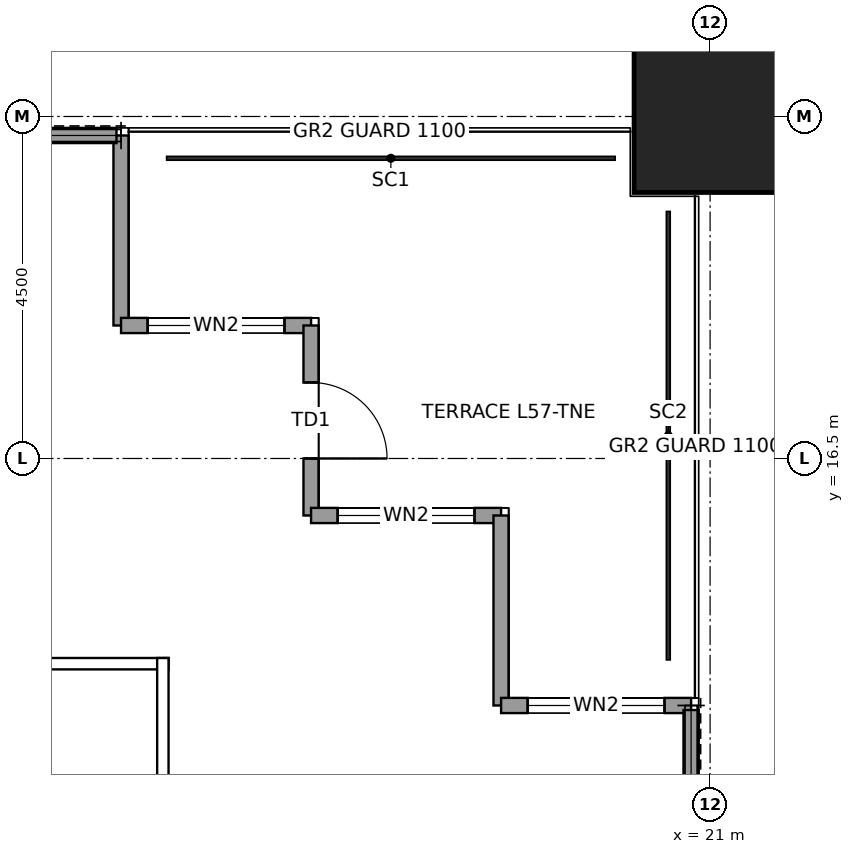
"""IFC4 building model, lengths in metres.
Left out: names, types, materials, properties, quantities, classifications, styles, units other than length and angle.
Written with IfcOpenShell. Run it as: python <this file> out.ifc"""

import sys

from ifc_helpers import new_model, si_unit, direction, frame, frame_2d, origin, origin_2d, place, context, subcontext, project, spatial, rectangle, hollow_rectangle, extrude, element, fill, save


model = new_model("IFC4")
c1 = context("Model", 3, precision=1e-05, world=origin(), true_north=direction((0.0, 1.0)))
c2 = subcontext(c1, "Body", "Model", "MODEL_VIEW")
j1 = project(units=[si_unit("LENGTHUNIT", "METRE"), si_unit("PLANEANGLEUNIT", "RADIAN")], contexts=[c1])
p1 = place(None, origin())
s1 = spatial("IfcSite", under=j1, at=p1, CompositionType="ELEMENT")
p2 = place(p1, origin())
s2 = spatial("IfcBuilding", under=s1, at=p2, CompositionType="ELEMENT")
p3 = place(p2, frame((0.0, 0.0, 263.9)))
s3 = spatial("IfcBuildingStorey", under=s2, at=p3, CompositionType="ELEMENT", Elevation=263.9)
p4 = place(p3, frame((21.0, 21.0, 0.0), z_axis=(0.0, 0.0, 1.0), x_axis=(1.0, 0.0, 0.0)))
e1 = element("IfcColumn", 1, at=p4, inside=s3, PredefinedType="COLUMN", context=c2, shape_type="SweptSolid", body=[
    extrude(hollow_rectangle(XDim=2.0, YDim=2.0, WallThickness=0.095, at=origin_2d()), origin(), (0.0, 0.0, 1.0), 4.0),
])
p5 = place(p3, frame((13.25, 20.75, 0.0), z_axis=(0.0, 0.0, 1.0), x_axis=(0.0, -1.0, 0.0)))
e2 = element("IfcWall", 2, at=p5, inside=s3, PredefinedType="SOLIDWALL", context=c2, shape_type="SweptSolid", body=[
    extrude(rectangle(XDim=2.5, YDim=0.2, at=frame_2d((1.25, 0.0))), origin(), (0.0, 0.0, 1.0), 3.85),
])
p6 = place(p3, frame((13.25, 18.25, 0.0), z_axis=(0.0, 0.0, 1.0), x_axis=(1.0, 0.0, 0.0)))
e3 = element("IfcWall", 3, at=p6, inside=s3, PredefinedType="SOLIDWALL", context=c2, shape_type="SweptSolid", body=[
    extrude(rectangle(XDim=2.5, YDim=0.2, at=frame_2d((1.25, 0.0))), origin(), (0.0, 0.0, 1.0), 3.85),
])
p7 = place(p6, frame((0.35, 0.0, 0.3)))
e4 = element("IfcOpeningElement", 4, at=p7, cuts=e3, PredefinedType="OPENING", context=c2, shape_type="SweptSolid", body=[
    extrude(rectangle(XDim=1.8, YDim=2.4, at=frame_2d((0.9, 1.2))), frame((0.0, 0.11, 0.0), z_axis=(0.0, -1.0, 0.0), x_axis=(1.0, 0.0, 0.0)), (0.0, 0.0, 1.0), 0.22),
])
p8 = place(p3, frame((15.75, 18.25, 0.0), z_axis=(0.0, 0.0, 1.0), x_axis=(0.0, -1.0, 0.0)))
e5 = element("IfcWall", 5, at=p8, inside=s3, PredefinedType="SOLIDWALL", context=c2, shape_type="SweptSolid", body=[
    extrude(rectangle(XDim=2.5, YDim=0.2, at=frame_2d((1.25, 0.0))), origin(), (0.0, 0.0, 1.0), 3.317),
])
p9 = place(p8, frame((0.75, 0.0, 0.0)))
e6 = element("IfcOpeningElement", 6, at=p9, cuts=e5, PredefinedType="OPENING", context=c2, shape_type="SweptSolid", body=[
    extrude(rectangle(XDim=1.0, YDim=2.4, at=frame_2d((0.5, 1.2))), frame((0.0, 0.11, 0.0), z_axis=(0.0, -1.0, 0.0), x_axis=(1.0, 0.0, 0.0)), (0.0, 0.0, 1.0), 0.22),
])
p10 = place(p3, frame((15.75, 15.75, 0.0), z_axis=(0.0, 0.0, 1.0), x_axis=(1.0, 0.0, 0.0)))
e7 = element("IfcWall", 7, at=p10, inside=s3, PredefinedType="SOLIDWALL", context=c2, shape_type="SweptSolid", body=[
    extrude(rectangle(XDim=2.5, YDim=0.2, at=frame_2d((1.25, 0.0))), origin(), (0.0, 0.0, 1.0), 3.85),
])
p11 = place(p10, frame((0.35, 0.0, 0.3)))
e8 = element("IfcOpeningElement", 8, at=p11, cuts=e7, PredefinedType="OPENING", context=c2, shape_type="SweptSolid", body=[
    extrude(rectangle(XDim=1.8, YDim=2.4, at=frame_2d((0.9, 1.2))), frame((0.0, 0.11, 0.0), z_axis=(0.0, -1.0, 0.0), x_axis=(1.0, 0.0, 0.0)), (0.0, 0.0, 1.0), 0.22),
])
p12 = place(p3, frame((18.25, 15.75, 0.0), z_axis=(0.0, 0.0, 1.0), x_axis=(0.0, -1.0, 0.0)))
e9 = element("IfcWall", 9, at=p12, inside=s3, PredefinedType="SOLIDWALL", context=c2, shape_type="SweptSolid", body=[
    extrude(rectangle(XDim=2.5, YDim=0.2, at=frame_2d((1.25, 0.0))), origin(), (0.0, 0.0, 1.0), 3.85),
])
p13 = place(p3, frame((18.25, 13.25, 0.0), z_axis=(0.0, 0.0, 1.0), x_axis=(1.0, 0.0, 0.0)))
e10 = element("IfcWall", 10, at=p13, inside=s3, PredefinedType="SOLIDWALL", context=c2, shape_type="SweptSolid", body=[
    extrude(rectangle(XDim=2.5, YDim=0.2, at=frame_2d((1.25, 0.0))), origin(), (0.0, 0.0, 1.0), 3.85),
])
p14 = place(p13, frame((0.35, 0.0, 0.3)))
e11 = element("IfcOpeningElement", 11, at=p14, cuts=e10, PredefinedType="OPENING", context=c2, shape_type="SweptSolid", body=[
    extrude(rectangle(XDim=1.8, YDim=2.4, at=frame_2d((0.9, 1.2))), frame((0.0, 0.11, 0.0), z_axis=(0.0, -1.0, 0.0), x_axis=(1.0, 0.0, 0.0)), (0.0, 0.0, 1.0), 0.22),
])
for number, where, z_axis, x_axis in (
    (12, (10.435, 20.75, 0.0), (0.0, 0.0, 1.0), (1.0, 0.0, 0.0)),
    (13, (20.75, 13.19, 0.0), (0.0, 0.0, 1.0), (0.0, -1.0, 0.0)),
):
    element("IfcWall", number, at=place(p3, frame(where, z_axis=z_axis, x_axis=x_axis)), inside=s3, PredefinedType="SOLIDWALL", context=c2, shape_type="SweptSolid", body=[
        extrude(rectangle(XDim=2.755, YDim=0.2, at=frame_2d((1.377, 0.0))), origin(), (0.0, 0.0, 1.0), 3.85),
    ])
p15 = place(p3, frame((-13.875, 13.8, 0.0), z_axis=(0.0, 0.0, 1.0), x_axis=(1.0, 0.0, 0.0)))
e14 = element("IfcWall", 14, at=p15, inside=s3, PredefinedType="PARTITIONING", context=c2, shape_type="SweptSolid", body=[
    extrude(rectangle(XDim=27.75, YDim=0.15, at=frame_2d((13.875, 0.0))), origin(), (0.0, 0.0, 1.0), 3.85),
])
p16 = place(p15, frame((20.275, 0.0, 0.0)))
e15 = element("IfcOpeningElement", 15, at=p16, cuts=e14, PredefinedType="OPENING", context=c2, shape_type="SweptSolid", body=[
    extrude(rectangle(XDim=1.0, YDim=2.4, at=frame_2d((0.5, 1.2))), frame((0.0, 0.085, 0.0), z_axis=(0.0, -1.0, 0.0), x_axis=(1.0, 0.0, 0.0)), (0.0, 0.0, 1.0), 0.17),
])
p17 = place(p3, frame((13.8, 2.425, 0.0), z_axis=(0.0, 0.0, 1.0), x_axis=(0.0, 1.0, 0.0)))
e16 = element("IfcWall", 16, at=p17, inside=s3, PredefinedType="PARTITIONING", context=c2, shape_type="SweptSolid", body=[
    extrude(rectangle(XDim=11.45, YDim=0.15, at=frame_2d((5.725, 0.0))), origin(), (0.0, 0.0, 1.0), 3.85),
])
p18 = place(p7, origin())
e17 = element("IfcWindow", 17, at=p18, inside=s3, PartitioningType="SINGLE_PANEL", PredefinedType="WINDOW", context=c2, shape_type="SweptSolid", body=[
    extrude(rectangle(XDim=1.8, YDim=2.4, at=frame_2d((0.9, 1.2))), frame((0.0, 0.03, 0.0), z_axis=(0.0, -1.0, 0.0), x_axis=(1.0, 0.0, 0.0)), (0.0, 0.0, 1.0), 0.06),
])
fill(e4, e17)
p19 = place(p9, origin())
e18 = element("IfcDoor", 18, at=p19, inside=s3, OperationType="SINGLE_SWING_RIGHT", PredefinedType="DOOR", context=c2, shape_type="SweptSolid", body=[
    extrude(rectangle(XDim=1.0, YDim=2.4, at=frame_2d((0.5, 1.2))), frame((0.0, 0.025, 0.0), z_axis=(0.0, -1.0, 0.0), x_axis=(1.0, 0.0, 0.0)), (0.0, 0.0, 1.0), 0.05),
])
fill(e6, e18)
p20 = place(p11, origin())
e19 = element("IfcWindow", 19, at=p20, inside=s3, PartitioningType="SINGLE_PANEL", PredefinedType="WINDOW", context=c2, shape_type="SweptSolid", body=[
    extrude(rectangle(XDim=1.8, YDim=2.4, at=frame_2d((0.9, 1.2))), frame((0.0, 0.03, 0.0), z_axis=(0.0, -1.0, 0.0), x_axis=(1.0, 0.0, 0.0)), (0.0, 0.0, 1.0), 0.06),
])
fill(e8, e19)
p21 = place(p14, origin())
e20 = element("IfcWindow", 20, at=p21, inside=s3, PartitioningType="SINGLE_PANEL", PredefinedType="WINDOW", context=c2, shape_type="SweptSolid", body=[
    extrude(rectangle(XDim=1.8, YDim=2.4, at=frame_2d((0.9, 1.2))), frame((0.0, 0.03, 0.0), z_axis=(0.0, -1.0, 0.0), x_axis=(1.0, 0.0, 0.0)), (0.0, 0.0, 1.0), 0.06),
])
fill(e11, e20)
save(model, sys.argv[1])
